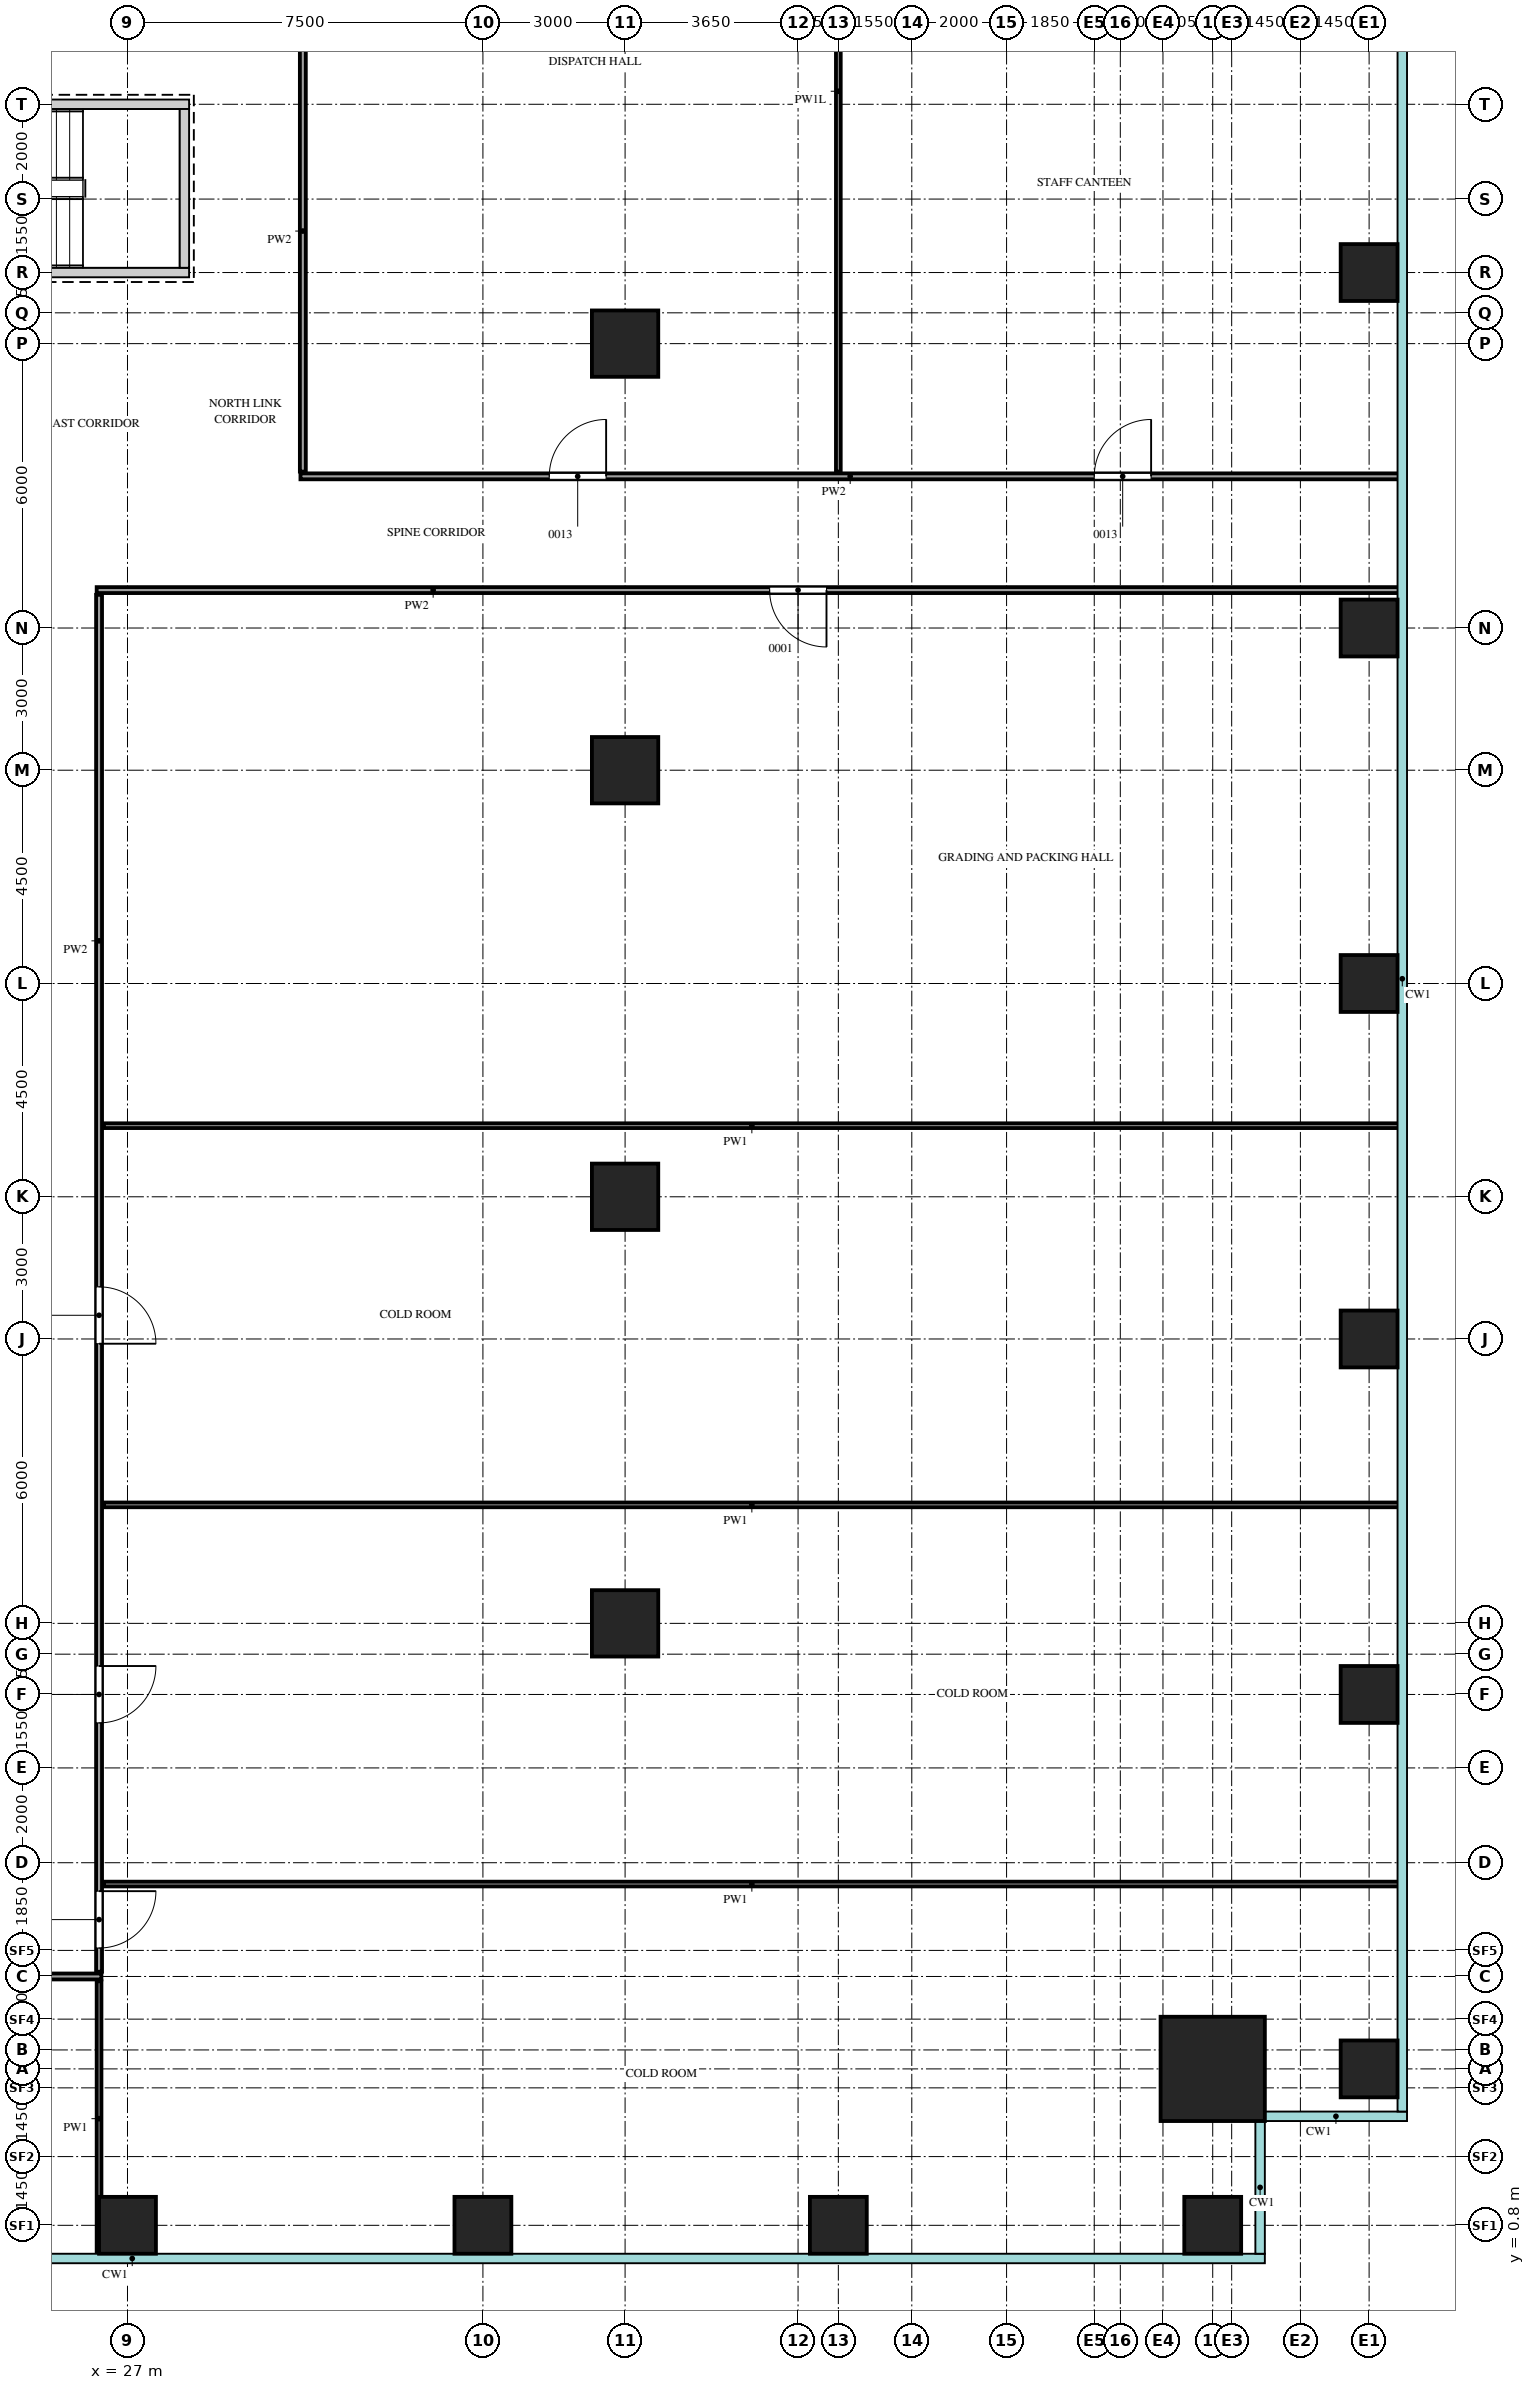
"""IFC4 building model, lengths in metres.
Left out: names, types, materials, properties, quantities, classifications, styles, units other than length and angle.
Written with IfcOpenShell. Run it as: python <this file> out.ifc"""

import sys

from ifc_helpers import new_model, si_unit, direction, frame, frame_2d, origin, origin_2d, place, context, subcontext, project, spatial, rectangle, extrude, source, transform, mapped, element, fill, save


model = new_model("IFC4")
c1 = context("Model", 3, precision=1e-05, world=origin(), true_north=direction((0.0, 1.0)))
c2 = subcontext(c1, "Body", "Model", "MODEL_VIEW")
j1 = project(units=[si_unit("LENGTHUNIT", "METRE"), si_unit("PLANEANGLEUNIT", "RADIAN")], contexts=[c1])
p1 = place(None, origin())
s1 = spatial("IfcSite", under=j1, at=p1, CompositionType="ELEMENT")
p2 = place(p1, origin())
s2 = spatial("IfcBuilding", under=s1, at=p2, CompositionType="ELEMENT")
p3 = place(p2, frame((0.0, 0.0, 91.5)))
s3 = spatial("IfcBuildingStorey", under=s2, at=p3, CompositionType="ELEMENT", Elevation=91.5)
m1 = source(origin(), c2, "Body", "SweptSolid", [
    extrude(rectangle(XDim=7.1, YDim=0.2, at=frame_2d((3.55, 0.0))), origin(), (0.0, 0.0, 1.0), 4.2),
])
p4 = place(p3, frame((21.2, 45.55, 0.0), z_axis=(0.0, 0.0, 1.0), x_axis=(1.0, 0.0, 0.0)))
e1 = element("IfcWall", 1, at=p4, inside=s3, PredefinedType="SHEAR", context=c2, shape_type="MappedRepresentation", body=[
    mapped(m1, transform((0.0, 0.0, 0.0))),
])
m2 = source(origin(), c2, "Body", "SweptSolid", [
    extrude(rectangle(XDim=1.2, YDim=2.1, at=frame_2d((0.6, 1.05))), frame((0.0, 0.11, 0.0), z_axis=(0.0, -1.0, 0.0), x_axis=(1.0, 0.0, 0.0)), (0.0, 0.0, 1.0), 0.22),
])
p5 = place(p4, frame((0.15, 0.0, 0.0)))
e2 = element("IfcOpeningElement", 2, at=p5, cuts=e1, PredefinedType="OPENING", context=c2, shape_type="MappedRepresentation", body=[
    mapped(m2, transform((0.0, 0.0, 0.0))),
])
p6 = place(p3, frame((21.2, 42.0, 0.0), z_axis=(0.0, 0.0, 1.0), x_axis=(1.0, 0.0, 0.0)))
e3 = element("IfcWall", 3, at=p6, inside=s3, PredefinedType="SHEAR", context=c2, shape_type="MappedRepresentation", body=[
    mapped(m1, transform((0.0, 0.0, 0.0))),
])
m3 = source(origin(), c2, "Body", "SweptSolid", [
    extrude(rectangle(XDim=3.35, YDim=0.2, at=frame_2d((1.675, 0.0))), origin(), (0.0, 0.0, 1.0), 4.2),
])
p7 = place(p3, frame((28.2, 42.1, 0.0), z_axis=(0.0, 0.0, 1.0), x_axis=(0.0, 1.0, 0.0)))
e4 = element("IfcWall", 4, at=p7, inside=s3, PredefinedType="SHEAR", context=c2, shape_type="MappedRepresentation", body=[
    mapped(m3, transform((0.0, 0.0, 0.0))),
])
m4 = source(origin(), c2, "Body", "SweptSolid", [
    extrude(rectangle(XDim=2.2, YDim=2.2, at=origin_2d()), origin(), (0.0, 0.0, 1.0), 4.5),
])
p8 = place(p3, frame((49.9, 4.1, 0.0), z_axis=(0.0, 0.0, 1.0), x_axis=(1.0, 0.0, 0.0)))
e5 = element("IfcColumn", 5, at=p8, inside=s3, PredefinedType="COLUMN", context=c2, shape_type="MappedRepresentation", body=[
    mapped(m4, transform((0.0, 0.0, 0.0))),
])
m5 = source(origin(), c2, "Body", "SweptSolid", [
    extrude(rectangle(XDim=1.2, YDim=1.2, at=origin_2d()), origin(), (0.0, 0.0, 1.0), 4.5),
])
for number, where, z_axis, x_axis in (
    (6, (27.0, 0.8, 0.0), (0.0, 0.0, 1.0), (1.0, 0.0, 0.0)),
    (7, (34.5, 0.8, 0.0), (0.0, 0.0, 1.0), (1.0, 0.0, 0.0)),
    (8, (42.0, 0.8, 0.0), (0.0, 0.0, 1.0), (1.0, 0.0, 0.0)),
    (9, (49.9, 0.8, 0.0), (0.0, 0.0, 1.0), (1.0, 0.0, 0.0)),
    (10, (53.2, 4.1, 0.0), (0.0, 0.0, 1.0), (1.0, 0.0, 0.0)),
    (11, (53.2, 12.0, 0.0), (0.0, 0.0, 1.0), (1.0, 0.0, 0.0)),
    (12, (53.2, 19.5, 0.0), (0.0, 0.0, 1.0), (1.0, 0.0, 0.0)),
    (13, (53.2, 27.0, 0.0), (0.0, 0.0, 1.0), (1.0, 0.0, 0.0)),
    (14, (53.2, 34.5, 0.0), (0.0, 0.0, 1.0), (1.0, 0.0, 0.0)),
    (15, (53.2, 42.0, 0.0), (0.0, 0.0, 1.0), (1.0, 0.0, 0.0)),
):
    element("IfcColumn", number, at=place(p3, frame(where, z_axis=z_axis, x_axis=x_axis)), inside=s3, PredefinedType="COLUMN", context=c2, shape_type="MappedRepresentation", body=[
        mapped(m5, transform((0.0, 0.0, 0.0))),
    ])
m6 = source(origin(), c2, "Body", "SweptSolid", [
    extrude(rectangle(XDim=1.4, YDim=1.4, at=origin_2d()), origin(), (0.0, 0.0, 1.0), 4.5),
])
for number, where, z_axis, x_axis in (
    (16, (37.5, 13.5, 0.0), (0.0, 0.0, 1.0), (1.0, 0.0, 0.0)),
    (17, (37.5, 22.5, 0.0), (0.0, 0.0, 1.0), (1.0, 0.0, 0.0)),
    (18, (37.5, 31.5, 0.0), (0.0, 0.0, 1.0), (1.0, 0.0, 0.0)),
    (19, (37.5, 40.5, 0.0), (0.0, 0.0, 1.0), (1.0, 0.0, 0.0)),
):
    element("IfcColumn", number, at=place(p3, frame(where, z_axis=z_axis, x_axis=x_axis)), inside=s3, PredefinedType="COLUMN", context=c2, shape_type="MappedRepresentation", body=[
        mapped(m6, transform((0.0, 0.0, 0.0))),
    ])
m7 = source(origin(), c2, "Body", "SweptSolid", [
    extrude(rectangle(XDim=5.8, YDim=0.1, at=frame_2d((2.9, 0.0))), origin(), (0.0, 0.0, 1.0), 4.3),
])
p9 = place(p3, frame((26.4, 0.15, 0.0), z_axis=(0.0, 0.0, 1.0), x_axis=(0.0, 1.0, 0.0)))
e20 = element("IfcWall", 20, at=p9, inside=s3, PredefinedType="PARTITIONING", context=c2, shape_type="MappedRepresentation", body=[
    mapped(m7, transform((0.0, 0.0, 0.0))),
])
m8 = source(origin(), c2, "Body", "SweptSolid", [
    extrude(rectangle(XDim=22.3, YDim=0.125, at=frame_2d((11.15, 0.0))), origin(), (0.0, 0.0, 1.0), 4.3),
])
p10 = place(p3, frame((4.15, 6.05, 0.0), z_axis=(0.0, 0.0, 1.0), x_axis=(1.0, 0.0, 0.0)))
e21 = element("IfcWall", 21, at=p10, inside=s3, PredefinedType="PARTITIONING", context=c2, shape_type="MappedRepresentation", body=[
    mapped(m8, transform((0.0, 0.0, 0.0))),
])
m9 = source(origin(), c2, "Body", "SweptSolid", [
    extrude(rectangle(XDim=0.9, YDim=2.1, at=frame_2d((0.45, 1.05))), frame((0.0, 0.073, 0.0), z_axis=(0.0, -1.0, 0.0), x_axis=(1.0, 0.0, 0.0)), (0.0, 0.0, 1.0), 0.145),
])
p11 = place(p10, frame((3.5, 0.0, 0.0)))
e22 = element("IfcOpeningElement", 22, at=p11, cuts=e21, PredefinedType="OPENING", context=c2, shape_type="MappedRepresentation", body=[
    mapped(m9, transform((0.0, 0.0, 0.0))),
])
p12 = place(p10, frame((13.25, 0.0, 0.0)))
e23 = element("IfcOpeningElement", 23, at=p12, cuts=e21, PredefinedType="OPENING", context=c2, shape_type="MappedRepresentation", body=[
    mapped(m9, transform((0.0, 0.0, 0.0))),
])
m10 = source(origin(), c2, "Body", "SweptSolid", [
    extrude(rectangle(XDim=29.05, YDim=0.125, at=frame_2d((14.525, 0.0))), origin(), (0.0, 0.0, 1.0), 4.3),
])
p13 = place(p3, frame((26.4, 6.15, 0.0), z_axis=(0.0, 0.0, 1.0), x_axis=(0.0, 1.0, 0.0)))
e24 = element("IfcWall", 24, at=p13, inside=s3, PredefinedType="PARTITIONING", context=c2, shape_type="MappedRepresentation", body=[
    mapped(m10, transform((0.0, 0.0, 0.0))),
])
m11 = source(origin(), c2, "Body", "SweptSolid", [
    extrude(rectangle(XDim=1.2, YDim=2.1, at=frame_2d((0.6, 1.05))), frame((0.0, 0.073, 0.0), z_axis=(0.0, -1.0, 0.0), x_axis=(1.0, 0.0, 0.0)), (0.0, 0.0, 1.0), 0.145),
])
p14 = place(p13, frame((0.5, 0.0, 0.0)))
e25 = element("IfcOpeningElement", 25, at=p14, cuts=e24, PredefinedType="OPENING", context=c2, shape_type="MappedRepresentation", body=[
    mapped(m11, transform((0.0, 0.0, 0.0))),
])
p15 = place(p13, frame((5.25, 0.0, 0.0)))
e26 = element("IfcOpeningElement", 26, at=p15, cuts=e24, PredefinedType="OPENING", context=c2, shape_type="MappedRepresentation", body=[
    mapped(m11, transform((0.0, 0.0, 0.0))),
])
p16 = place(p13, frame((13.25, 0.0, 0.0)))
e27 = element("IfcOpeningElement", 27, at=p16, cuts=e24, PredefinedType="OPENING", context=c2, shape_type="MappedRepresentation", body=[
    mapped(m11, transform((0.0, 0.0, 0.0))),
])
m12 = source(origin(), c2, "Body", "SweptSolid", [
    extrude(rectangle(XDim=27.35, YDim=0.1, at=frame_2d((13.675, 0.0))), origin(), (0.0, 0.0, 1.0), 4.3),
])
for number, where, z_axis, x_axis in (
    (28, (26.5, 8.0, 0.0), (0.0, 0.0, 1.0), (1.0, 0.0, 0.0)),
    (29, (26.5, 16.0, 0.0), (0.0, 0.0, 1.0), (1.0, 0.0, 0.0)),
    (30, (26.5, 24.0, 0.0), (0.0, 0.0, 1.0), (1.0, 0.0, 0.0)),
):
    element("IfcWall", number, at=place(p3, frame(where, z_axis=z_axis, x_axis=x_axis)), inside=s3, PredefinedType="PARTITIONING", context=c2, shape_type="MappedRepresentation", body=[
        mapped(m12, transform((0.0, 0.0, 0.0))),
    ])
m13 = source(origin(), c2, "Body", "SweptSolid", [
    extrude(rectangle(XDim=27.5, YDim=0.125, at=frame_2d((13.75, 0.0))), origin(), (0.0, 0.0, 1.0), 4.3),
])
p17 = place(p3, frame((26.35, 35.3, 0.0), z_axis=(0.0, 0.0, 1.0), x_axis=(1.0, 0.0, 0.0)))
e31 = element("IfcWall", 31, at=p17, inside=s3, PredefinedType="PARTITIONING", context=c2, shape_type="MappedRepresentation", body=[
    mapped(m13, transform((0.0, 0.0, 0.0))),
])
p18 = place(p17, frame((14.2, 0.0, 0.0)))
e32 = element("IfcOpeningElement", 32, at=p18, cuts=e31, PredefinedType="OPENING", context=c2, shape_type="MappedRepresentation", body=[
    mapped(m11, transform((0.0, 0.0, 0.0))),
])
m14 = source(origin(), c2, "Body", "SweptSolid", [
    extrude(rectangle(XDim=23.2, YDim=0.125, at=frame_2d((11.6, 0.0))), origin(), (0.0, 0.0, 1.0), 4.3),
])
p19 = place(p3, frame((30.65, 37.7, 0.0), z_axis=(0.0, 0.0, 1.0), x_axis=(1.0, 0.0, 0.0)))
e33 = element("IfcWall", 33, at=p19, inside=s3, PredefinedType="PARTITIONING", context=c2, shape_type="MappedRepresentation", body=[
    mapped(m14, transform((0.0, 0.0, 0.0))),
])
p20 = place(p19, frame((5.25, 0.0, 0.0)))
e34 = element("IfcOpeningElement", 34, at=p20, cuts=e33, PredefinedType="OPENING", context=c2, shape_type="MappedRepresentation", body=[
    mapped(m11, transform((0.0, 0.0, 0.0))),
])
p21 = place(p19, frame((16.75, 0.0, 0.0)))
e35 = element("IfcOpeningElement", 35, at=p21, cuts=e33, PredefinedType="OPENING", context=c2, shape_type="MappedRepresentation", body=[
    mapped(m11, transform((0.0, 0.0, 0.0))),
])
m15 = source(origin(), c2, "Body", "SweptSolid", [
    extrude(rectangle(XDim=10.15, YDim=0.125, at=frame_2d((5.075, 0.0))), origin(), (0.0, 0.0, 1.0), 4.3),
])
p22 = place(p3, frame((30.7, 37.8, 0.0), z_axis=(0.0, 0.0, 1.0), x_axis=(0.0, 1.0, 0.0)))
e36 = element("IfcWall", 36, at=p22, inside=s3, PredefinedType="PARTITIONING", context=c2, shape_type="MappedRepresentation", body=[
    mapped(m15, transform((0.0, 0.0, 0.0))),
])
m16 = source(origin(), c2, "Body", "SweptSolid", [
    extrude(rectangle(XDim=16.05, YDim=0.1, at=frame_2d((8.025, 0.0))), origin(), (0.0, 0.0, 1.0), 3.6),
])
p23 = place(p3, frame((42.0, 37.8, 0.0), z_axis=(0.0, 0.0, 1.0), x_axis=(0.0, 1.0, 0.0)))
e37 = element("IfcWall", 37, at=p23, inside=s3, PredefinedType="PARTITIONING", context=c2, shape_type="MappedRepresentation", body=[
    mapped(m16, transform((0.0, 0.0, 0.0))),
])
m17 = source(origin(), c2, "Body", "SweptSolid", [
    extrude(rectangle(XDim=1.2, YDim=2.1, at=frame_2d((0.6, 1.05))), frame((0.0, 0.025, 0.0), z_axis=(0.0, -1.0, 0.0), x_axis=(1.0, 0.0, 0.0)), (0.0, 0.0, 1.0), 0.05),
])
p24 = place(p14, origin())
e38 = element("IfcDoor", 38, at=p24, inside=s3, OperationType="SINGLE_SWING_RIGHT", PredefinedType="DOOR", context=c2, shape_type="MappedRepresentation", body=[
    mapped(m17, transform((0.0, 0.0, 0.0))),
])
fill(e25, e38)
p25 = place(p15, origin())
e39 = element("IfcDoor", 39, at=p25, inside=s3, OperationType="SINGLE_SWING_RIGHT", PredefinedType="DOOR", context=c2, shape_type="MappedRepresentation", body=[
    mapped(m17, transform((0.0, 0.0, 0.0))),
])
fill(e26, e39)
p26 = place(p16, origin())
e40 = element("IfcDoor", 40, at=p26, inside=s3, OperationType="SINGLE_SWING_LEFT", PredefinedType="DOOR", context=c2, shape_type="MappedRepresentation", body=[
    mapped(m17, transform((0.0, 0.0, 0.0))),
])
fill(e27, e40)
p27 = place(p18, origin())
e41 = element("IfcDoor", 41, at=p27, inside=s3, OperationType="SINGLE_SWING_RIGHT", PredefinedType="DOOR", context=c2, shape_type="MappedRepresentation", body=[
    mapped(m17, transform((0.0, 0.0, 0.0))),
])
fill(e32, e41)
p28 = place(p20, origin())
e42 = element("IfcDoor", 42, at=p28, inside=s3, OperationType="SINGLE_SWING_LEFT", PredefinedType="DOOR", context=c2, shape_type="MappedRepresentation", body=[
    mapped(m17, transform((0.0, 0.0, 0.0))),
])
fill(e34, e42)
p29 = place(p21, origin())
e43 = element("IfcDoor", 43, at=p29, inside=s3, OperationType="SINGLE_SWING_LEFT", PredefinedType="DOOR", context=c2, shape_type="MappedRepresentation", body=[
    mapped(m17, transform((0.0, 0.0, 0.0))),
])
fill(e35, e43)
save(model, sys.argv[1])
